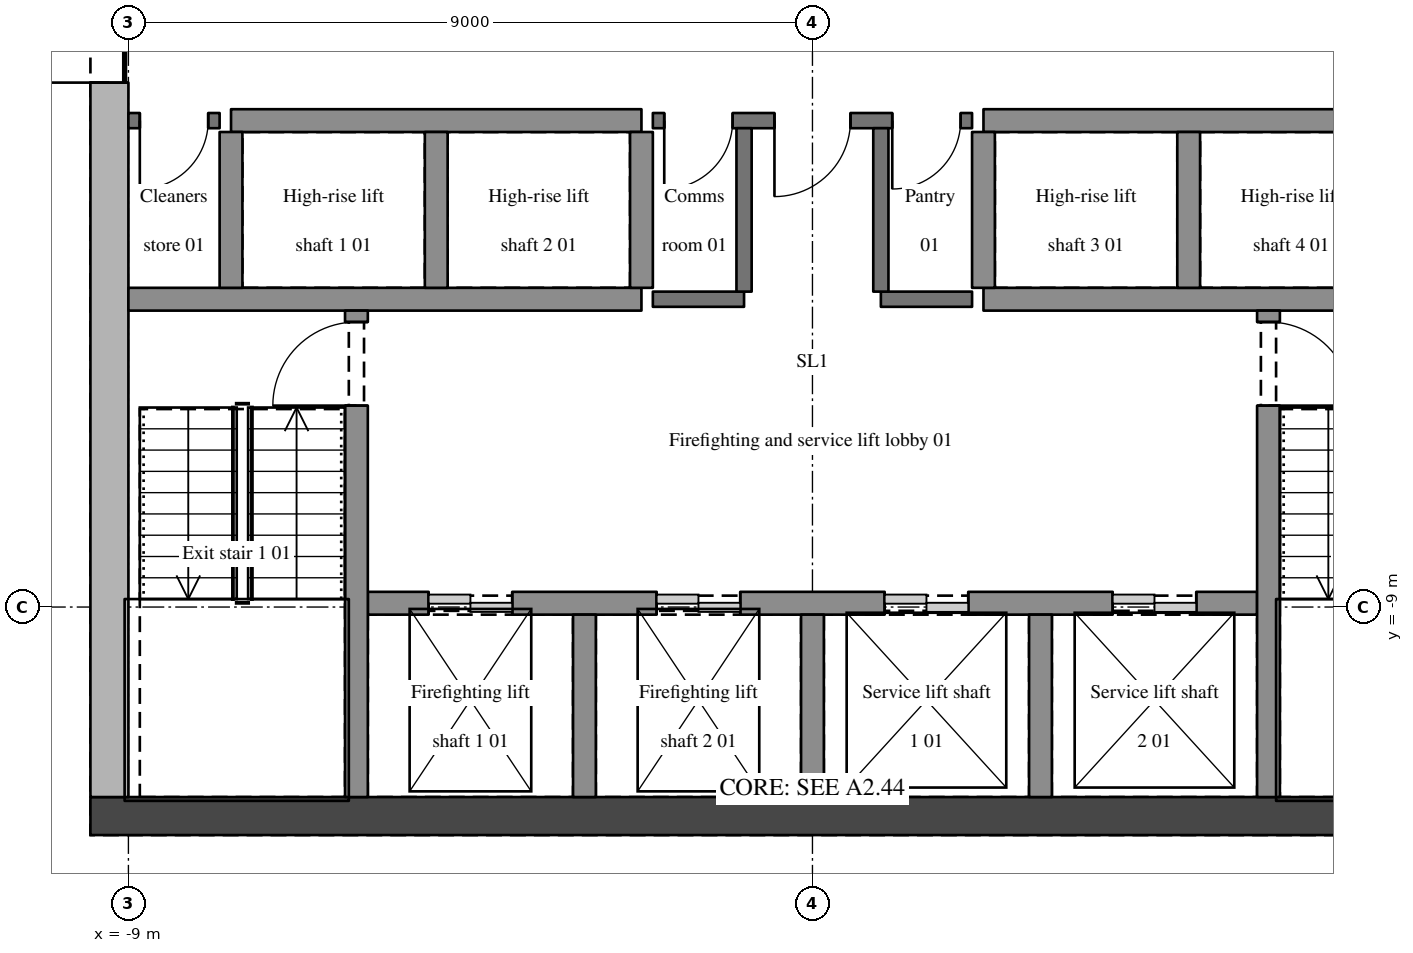
"""IFC4 building model, lengths in metres.
Left out: names, types, materials, properties, quantities, classifications, styles, units other than length and angle.
Written with IfcOpenShell. Run it as: python <this file> out.ifc"""

import sys

from ifc_helpers import new_model, si_unit, direction, frame, frame_2d, origin, place, context, subcontext, project, spatial, polyline, rectangle, outline, extrude, element, fill, save


model = new_model("IFC4")
c1 = context("Model", 3, precision=1e-05, world=origin(), true_north=direction((0.0, 1.0)))
c2 = subcontext(c1, "Body", "Model", "MODEL_VIEW")
j1 = project(units=[si_unit("LENGTHUNIT", "METRE"), si_unit("PLANEANGLEUNIT", "RADIAN")], contexts=[c1])
p1 = place(None, origin())
s1 = spatial("IfcSite", under=j1, at=p1, CompositionType="ELEMENT")
p2 = place(p1, origin())
s2 = spatial("IfcBuilding", under=s1, at=p2, CompositionType="ELEMENT")
p3 = place(p2, frame((0.0, 0.0, 297.3)))
s3 = spatial("IfcBuildingStorey", under=s2, at=p3, CompositionType="ELEMENT", Elevation=297.3)
p4 = place(p3, frame((-9.5, -11.75, 0.0), z_axis=(0.0, 0.0, 1.0), x_axis=(1.0, 0.0, 0.0)))
e1 = element("IfcWall", 1, at=p4, inside=s3, PredefinedType="SHEAR", context=c2, shape_type="SweptSolid", body=[
    extrude(outline(polyline([(0.0, 0.0), (19.0, 0.0), (19.0, 3.6), (0.0, 3.6), (0.0, 0.0)])), frame((0.0, 0.25, 0.0), z_axis=(0.0, -1.0, 0.0), x_axis=(1.0, 0.0, 0.0)), (0.0, 0.0, 1.0), 0.5),
])
p5 = place(p3, frame((-9.25, -11.5, 0.0), z_axis=(0.0, 0.0, 1.0), x_axis=(0.0, 1.0, 0.0)))
e2 = element("IfcWall", 2, at=p5, inside=s3, PredefinedType="SHEAR", context=c2, shape_type="SweptSolid", body=[
    extrude(outline(polyline([(0.0, 0.0), (11.65, 0.0), (11.65, 3.6), (0.0, 3.6), (0.0, 0.0)])), frame((0.0, 0.25, 0.0), z_axis=(0.0, -1.0, 0.0), x_axis=(1.0, 0.0, 0.0)), (0.0, 0.0, 1.0), 0.5),
])
p6 = place(p5, frame((9.4, 0.0, 0.0)))
e3 = element("IfcOpeningElement", 3, at=p6, cuts=e2, PredefinedType="OPENING", context=c2, shape_type="SweptSolid", body=[
    extrude(rectangle(XDim=1.8, YDim=2.1, at=frame_2d((0.9, 1.05))), frame((0.0, 0.26, 0.0), z_axis=(0.0, -1.0, 0.0), x_axis=(1.0, 0.0, 0.0)), (0.0, 0.0, 1.0), 0.52),
])
p7 = place(p3, frame((-5.85, -8.95, 0.0), z_axis=(0.0, 0.0, 1.0), x_axis=(1.0, 0.0, 0.0)))
e4 = element("IfcWall", 4, at=p7, inside=s3, PredefinedType="SHEAR", context=c2, shape_type="SweptSolid", body=[
    extrude(rectangle(XDim=11.7, YDim=0.3, at=frame_2d((5.85, 0.0))), origin(), (0.0, 0.0, 1.0), 3.6),
])
p8 = place(p7, frame((0.8, 0.0, 0.0)))
e5 = element("IfcOpeningElement", 5, at=p8, cuts=e4, PredefinedType="OPENING", context=c2, shape_type="SweptSolid", body=[
    extrude(rectangle(XDim=1.1, YDim=2.1, at=frame_2d((0.55, 1.05))), frame((0.0, 0.16, 0.0), z_axis=(0.0, -1.0, 0.0), x_axis=(1.0, 0.0, 0.0)), (0.0, 0.0, 1.0), 0.32),
])
p9 = place(p7, frame((3.8, 0.0, 0.0)))
e6 = element("IfcOpeningElement", 6, at=p9, cuts=e4, PredefinedType="OPENING", context=c2, shape_type="SweptSolid", body=[
    extrude(rectangle(XDim=1.1, YDim=2.1, at=frame_2d((0.55, 1.05))), frame((0.0, 0.16, 0.0), z_axis=(0.0, -1.0, 0.0), x_axis=(1.0, 0.0, 0.0)), (0.0, 0.0, 1.0), 0.32),
])
p10 = place(p7, frame((6.8, 0.0, 0.0)))
e7 = element("IfcOpeningElement", 7, at=p10, cuts=e4, PredefinedType="OPENING", context=c2, shape_type="SweptSolid", body=[
    extrude(rectangle(XDim=1.1, YDim=2.1, at=frame_2d((0.55, 1.05))), frame((0.0, 0.16, 0.0), z_axis=(0.0, -1.0, 0.0), x_axis=(1.0, 0.0, 0.0)), (0.0, 0.0, 1.0), 0.32),
])
p11 = place(p7, frame((9.8, 0.0, 0.0)))
e8 = element("IfcOpeningElement", 8, at=p11, cuts=e4, PredefinedType="OPENING", context=c2, shape_type="SweptSolid", body=[
    extrude(rectangle(XDim=1.1, YDim=2.1, at=frame_2d((0.55, 1.05))), frame((0.0, 0.16, 0.0), z_axis=(0.0, -1.0, 0.0), x_axis=(1.0, 0.0, 0.0)), (0.0, 0.0, 1.0), 0.32),
])
p12 = place(p3, frame((-9.0, -4.95, 0.0), z_axis=(0.0, 0.0, 1.0), x_axis=(1.0, 0.0, 0.0)))
e9 = element("IfcWall", 9, at=p12, inside=s3, PredefinedType="SHEAR", context=c2, shape_type="SweptSolid", body=[
    extrude(rectangle(XDim=6.75, YDim=0.3, at=frame_2d((3.375, 0.0))), origin(), (0.0, 0.0, 1.0), 3.6),
])
for number, where, z_axis, x_axis in (
    (10, (-2.1, -4.95, 0.0), (0.0, 0.0, 1.0), (1.0, 0.0, 0.0)),
    (11, (0.9, -4.95, 0.0), (0.0, 0.0, 1.0), (1.0, 0.0, 0.0)),
):
    element("IfcWall", number, at=place(p3, frame(where, z_axis=z_axis, x_axis=x_axis)), inside=s3, PredefinedType="SOLIDWALL", context=c2, shape_type="SweptSolid", body=[
        extrude(rectangle(XDim=1.2, YDim=0.2, at=frame_2d((0.6, 0.0))), origin(), (0.0, 0.0, 1.0), 3.3),
    ])
p13 = place(p3, frame((2.25, -4.95, 0.0), z_axis=(0.0, 0.0, 1.0), x_axis=(1.0, 0.0, 0.0)))
e12 = element("IfcWall", 12, at=p13, inside=s3, PredefinedType="SHEAR", context=c2, shape_type="SweptSolid", body=[
    extrude(rectangle(XDim=6.75, YDim=0.3, at=frame_2d((3.375, 0.0))), origin(), (0.0, 0.0, 1.0), 3.6),
])
p14 = place(p3, frame((-7.8, -2.6, 0.0), z_axis=(0.0, 0.0, 1.0), x_axis=(-1.0, 0.0, 0.0)))
e13 = element("IfcWall", 13, at=p14, inside=s3, PredefinedType="SOLIDWALL", context=c2, shape_type="SweptSolid", body=[
    extrude(rectangle(XDim=1.2, YDim=0.2, at=frame_2d((0.6, 0.0))), origin(), (0.0, 0.0, 1.0), 3.3),
])
p15 = place(p14, frame((0.15, 0.0, 0.0)))
e14 = element("IfcOpeningElement", 14, at=p15, cuts=e13, PredefinedType="OPENING", context=c2, shape_type="SweptSolid", body=[
    extrude(rectangle(XDim=0.9, YDim=2.1, at=frame_2d((0.45, 1.05))), frame((0.0, 0.11, 0.0), z_axis=(0.0, -1.0, 0.0), x_axis=(1.0, 0.0, 0.0)), (0.0, 0.0, 1.0), 0.22),
])
p16 = place(p3, frame((-7.65, -2.6, 0.0), z_axis=(0.0, 0.0, 1.0), x_axis=(1.0, 0.0, 0.0)))
e15 = element("IfcWall", 15, at=p16, inside=s3, PredefinedType="SHEAR", context=c2, shape_type="SweptSolid", body=[
    extrude(rectangle(XDim=5.4, YDim=0.3, at=frame_2d((2.7, 0.0))), origin(), (0.0, 0.0, 1.0), 3.6),
])
p17 = place(p3, frame((2.1, -2.6, 0.0), z_axis=(0.0, 0.0, 1.0), x_axis=(-1.0, 0.0, 0.0)))
e16 = element("IfcWall", 16, at=p17, inside=s3, PredefinedType="SOLIDWALL", context=c2, shape_type="SweptSolid", body=[
    extrude(rectangle(XDim=4.2, YDim=0.2, at=frame_2d((2.1, 0.0))), origin(), (0.0, 0.0, 1.0), 3.3),
])
p18 = place(p17, frame((1.6, 0.0, 0.0)))
e17 = element("IfcOpeningElement", 17, at=p18, cuts=e16, PredefinedType="OPENING", context=c2, shape_type="SweptSolid", body=[
    extrude(rectangle(XDim=1.0, YDim=2.1, at=frame_2d((0.5, 1.05))), frame((0.0, 0.11, 0.0), z_axis=(0.0, -1.0, 0.0), x_axis=(1.0, 0.0, 0.0)), (0.0, 0.0, 1.0), 0.22),
])
p19 = place(p17, frame((3.15, 0.0, 0.0)))
e18 = element("IfcOpeningElement", 18, at=p19, cuts=e16, PredefinedType="OPENING", context=c2, shape_type="SweptSolid", body=[
    extrude(rectangle(XDim=0.9, YDim=2.1, at=frame_2d((0.45, 1.05))), frame((0.0, 0.11, 0.0), z_axis=(0.0, -1.0, 0.0), x_axis=(1.0, 0.0, 0.0)), (0.0, 0.0, 1.0), 0.22),
])
p20 = place(p17, frame((0.15, 0.0, 0.0)))
e19 = element("IfcOpeningElement", 19, at=p20, cuts=e16, PredefinedType="OPENING", context=c2, shape_type="SweptSolid", body=[
    extrude(rectangle(XDim=0.9, YDim=2.1, at=frame_2d((0.45, 1.05))), frame((0.0, 0.11, 0.0), z_axis=(0.0, -1.0, 0.0), x_axis=(1.0, 0.0, 0.0)), (0.0, 0.0, 1.0), 0.22),
])
p21 = place(p3, frame((2.25, -2.6, 0.0), z_axis=(0.0, 0.0, 1.0), x_axis=(1.0, 0.0, 0.0)))
e20 = element("IfcWall", 20, at=p21, inside=s3, PredefinedType="SHEAR", context=c2, shape_type="SweptSolid", body=[
    extrude(rectangle(XDim=5.4, YDim=0.3, at=frame_2d((2.7, 0.0))), origin(), (0.0, 0.0, 1.0), 3.6),
])
p22 = place(p3, frame((-7.65, -4.8, 0.0), z_axis=(0.0, 0.0, 1.0), x_axis=(0.0, 1.0, 0.0)))
e21 = element("IfcWall", 21, at=p22, inside=s3, PredefinedType="SHEAR", context=c2, shape_type="SweptSolid", body=[
    extrude(rectangle(XDim=2.05, YDim=0.3, at=frame_2d((1.025, 0.0))), origin(), (0.0, 0.0, 1.0), 3.6),
])
p23 = place(p3, frame((-6.0, -11.5, 0.0), z_axis=(0.0, 0.0, 1.0), x_axis=(0.0, 1.0, 0.0)))
e22 = element("IfcWall", 22, at=p23, inside=s3, PredefinedType="SHEAR", context=c2, shape_type="SweptSolid", body=[
    extrude(rectangle(XDim=6.4, YDim=0.3, at=frame_2d((3.2, 0.0))), origin(), (0.0, 0.0, 1.0), 3.6),
])
p24 = place(p23, frame((5.15, 0.0, 0.0)))
e23 = element("IfcOpeningElement", 23, at=p24, cuts=e22, PredefinedType="OPENING", context=c2, shape_type="SweptSolid", body=[
    extrude(rectangle(XDim=1.1, YDim=2.1, at=frame_2d((0.55, 1.05))), frame((0.0, 0.16, 0.0), z_axis=(0.0, -1.0, 0.0), x_axis=(1.0, 0.0, 0.0)), (0.0, 0.0, 1.0), 0.32),
])
p25 = place(p3, frame((-4.95, -4.8, 0.0), z_axis=(0.0, 0.0, 1.0), x_axis=(0.0, 1.0, 0.0)))
e24 = element("IfcWall", 24, at=p25, inside=s3, PredefinedType="SHEAR", context=c2, shape_type="SweptSolid", body=[
    extrude(rectangle(XDim=2.05, YDim=0.3, at=frame_2d((1.025, 0.0))), origin(), (0.0, 0.0, 1.0), 3.6),
])
p26 = place(p3, frame((-3.0, -11.5, 0.0), z_axis=(0.0, 0.0, 1.0), x_axis=(0.0, 1.0, 0.0)))
e25 = element("IfcWall", 25, at=p26, inside=s3, PredefinedType="SHEAR", context=c2, shape_type="SweptSolid", body=[
    extrude(rectangle(XDim=2.4, YDim=0.3, at=frame_2d((1.2, 0.0))), origin(), (0.0, 0.0, 1.0), 3.6),
])
p27 = place(p3, frame((-2.25, -4.8, 0.0), z_axis=(0.0, 0.0, 1.0), x_axis=(0.0, 1.0, 0.0)))
e26 = element("IfcWall", 26, at=p27, inside=s3, PredefinedType="SHEAR", context=c2, shape_type="SweptSolid", body=[
    extrude(rectangle(XDim=2.05, YDim=0.3, at=frame_2d((1.025, 0.0))), origin(), (0.0, 0.0, 1.0), 3.6),
])
p28 = place(p3, frame((-0.9, -4.85, 0.0), z_axis=(0.0, 0.0, 1.0), x_axis=(0.0, 1.0, 0.0)))
e27 = element("IfcWall", 27, at=p28, inside=s3, PredefinedType="SOLIDWALL", context=c2, shape_type="SweptSolid", body=[
    extrude(rectangle(XDim=2.15, YDim=0.2, at=frame_2d((1.075, 0.0))), origin(), (0.0, 0.0, 1.0), 3.3),
])
p29 = place(p3, frame((0.0, -11.5, 0.0), z_axis=(0.0, 0.0, 1.0), x_axis=(0.0, 1.0, 0.0)))
e28 = element("IfcWall", 28, at=p29, inside=s3, PredefinedType="SHEAR", context=c2, shape_type="SweptSolid", body=[
    extrude(rectangle(XDim=2.4, YDim=0.3, at=frame_2d((1.2, 0.0))), origin(), (0.0, 0.0, 1.0), 3.6),
])
p30 = place(p3, frame((0.9, -4.85, 0.0), z_axis=(0.0, 0.0, 1.0), x_axis=(0.0, 1.0, 0.0)))
e29 = element("IfcWall", 29, at=p30, inside=s3, PredefinedType="SOLIDWALL", context=c2, shape_type="SweptSolid", body=[
    extrude(rectangle(XDim=2.15, YDim=0.2, at=frame_2d((1.075, 0.0))), origin(), (0.0, 0.0, 1.0), 3.3),
])
p31 = place(p3, frame((2.25, -4.8, 0.0), z_axis=(0.0, 0.0, 1.0), x_axis=(0.0, 1.0, 0.0)))
e30 = element("IfcWall", 30, at=p31, inside=s3, PredefinedType="SHEAR", context=c2, shape_type="SweptSolid", body=[
    extrude(rectangle(XDim=2.05, YDim=0.3, at=frame_2d((1.025, 0.0))), origin(), (0.0, 0.0, 1.0), 3.6),
])
p32 = place(p3, frame((3.0, -11.5, 0.0), z_axis=(0.0, 0.0, 1.0), x_axis=(0.0, 1.0, 0.0)))
e31 = element("IfcWall", 31, at=p32, inside=s3, PredefinedType="SHEAR", context=c2, shape_type="SweptSolid", body=[
    extrude(rectangle(XDim=2.4, YDim=0.3, at=frame_2d((1.2, 0.0))), origin(), (0.0, 0.0, 1.0), 3.6),
])
p33 = place(p3, frame((4.95, -4.8, 0.0), z_axis=(0.0, 0.0, 1.0), x_axis=(0.0, 1.0, 0.0)))
e32 = element("IfcWall", 32, at=p33, inside=s3, PredefinedType="SHEAR", context=c2, shape_type="SweptSolid", body=[
    extrude(rectangle(XDim=2.05, YDim=0.3, at=frame_2d((1.025, 0.0))), origin(), (0.0, 0.0, 1.0), 3.6),
])
p34 = place(p3, frame((6.0, -5.1, 0.0), z_axis=(0.0, 0.0, 1.0), x_axis=(0.0, -1.0, 0.0)))
e33 = element("IfcWall", 33, at=p34, inside=s3, PredefinedType="SHEAR", context=c2, shape_type="SweptSolid", body=[
    extrude(rectangle(XDim=6.4, YDim=0.3, at=frame_2d((3.2, 0.0))), origin(), (0.0, 0.0, 1.0), 3.6),
])
p35 = place(p34, frame((0.15, 0.0, 0.0)))
e34 = element("IfcOpeningElement", 34, at=p35, cuts=e33, PredefinedType="OPENING", context=c2, shape_type="SweptSolid", body=[
    extrude(rectangle(XDim=1.1, YDim=2.1, at=frame_2d((0.55, 1.05))), frame((0.0, 0.16, 0.0), z_axis=(0.0, -1.0, 0.0), x_axis=(1.0, 0.0, 0.0)), (0.0, 0.0, 1.0), 0.32),
])
p36 = place(p6, origin())
e35 = element("IfcDoor", 35, at=p36, inside=s3, OperationType="DOUBLE_DOOR_SINGLE_SWING", PredefinedType="DOOR", context=c2, shape_type="SweptSolid", body=[
    extrude(rectangle(XDim=1.8, YDim=2.1, at=frame_2d((0.9, 1.05))), frame((0.0, 0.025, 0.0), z_axis=(0.0, -1.0, 0.0), x_axis=(1.0, 0.0, 0.0)), (0.0, 0.0, 1.0), 0.05),
])
fill(e3, e35)
p37 = place(p18, origin())
e36 = element("IfcDoor", 36, at=p37, inside=s3, OperationType="SINGLE_SWING_RIGHT", PredefinedType="DOOR", context=c2, shape_type="SweptSolid", body=[
    extrude(rectangle(XDim=1.0, YDim=2.1, at=frame_2d((0.5, 1.05))), frame((0.0, 0.025, 0.0), z_axis=(0.0, -1.0, 0.0), x_axis=(1.0, 0.0, 0.0)), (0.0, 0.0, 1.0), 0.05),
])
fill(e17, e36)
p38 = place(p24, origin())
e37 = element("IfcDoor", 37, at=p38, inside=s3, OperationType="SINGLE_SWING_LEFT", PredefinedType="DOOR", context=c2, shape_type="SweptSolid", body=[
    extrude(rectangle(XDim=1.1, YDim=2.1, at=frame_2d((0.55, 1.05))), frame((0.0, 0.025, 0.0), z_axis=(0.0, -1.0, 0.0), x_axis=(1.0, 0.0, 0.0)), (0.0, 0.0, 1.0), 0.05),
])
fill(e23, e37)
p39 = place(p35, origin())
e38 = element("IfcDoor", 38, at=p39, inside=s3, OperationType="SINGLE_SWING_RIGHT", PredefinedType="DOOR", context=c2, shape_type="SweptSolid", body=[
    extrude(rectangle(XDim=1.1, YDim=2.1, at=frame_2d((0.55, 1.05))), frame((0.0, 0.025, 0.0), z_axis=(0.0, -1.0, 0.0), x_axis=(1.0, 0.0, 0.0)), (0.0, 0.0, 1.0), 0.05),
])
fill(e34, e38)
p40 = place(p19, origin())
e39 = element("IfcDoor", 39, at=p40, inside=s3, OperationType="SINGLE_SWING_RIGHT", PredefinedType="DOOR", context=c2, shape_type="SweptSolid", body=[
    extrude(rectangle(XDim=0.9, YDim=2.1, at=frame_2d((0.45, 1.05))), frame((0.0, 0.025, 0.0), z_axis=(0.0, -1.0, 0.0), x_axis=(1.0, 0.0, 0.0)), (0.0, 0.0, 1.0), 0.05),
])
fill(e18, e39)
p41 = place(p20, origin())
e40 = element("IfcDoor", 40, at=p41, inside=s3, OperationType="SINGLE_SWING_RIGHT", PredefinedType="DOOR", context=c2, shape_type="SweptSolid", body=[
    extrude(rectangle(XDim=0.9, YDim=2.1, at=frame_2d((0.45, 1.05))), frame((0.0, 0.025, 0.0), z_axis=(0.0, -1.0, 0.0), x_axis=(1.0, 0.0, 0.0)), (0.0, 0.0, 1.0), 0.05),
])
fill(e19, e40)
p42 = place(p15, origin())
e41 = element("IfcDoor", 41, at=p42, inside=s3, OperationType="SINGLE_SWING_RIGHT", PredefinedType="DOOR", context=c2, shape_type="SweptSolid", body=[
    extrude(rectangle(XDim=0.9, YDim=2.1, at=frame_2d((0.45, 1.05))), frame((0.0, 0.025, 0.0), z_axis=(0.0, -1.0, 0.0), x_axis=(1.0, 0.0, 0.0)), (0.0, 0.0, 1.0), 0.05),
])
fill(e14, e41)
p43 = place(p8, origin())
e42 = element("IfcDoor", 42, at=p43, inside=s3, OperationType="DOUBLE_DOOR_SLIDING", PredefinedType="DOOR", context=c2, shape_type="SweptSolid", body=[
    extrude(rectangle(XDim=1.1, YDim=2.1, at=frame_2d((0.55, 1.05))), frame((0.0, 0.025, 0.0), z_axis=(0.0, -1.0, 0.0), x_axis=(1.0, 0.0, 0.0)), (0.0, 0.0, 1.0), 0.05),
])
fill(e5, e42)
p44 = place(p9, origin())
e43 = element("IfcDoor", 43, at=p44, inside=s3, OperationType="DOUBLE_DOOR_SLIDING", PredefinedType="DOOR", context=c2, shape_type="SweptSolid", body=[
    extrude(rectangle(XDim=1.1, YDim=2.1, at=frame_2d((0.55, 1.05))), frame((0.0, 0.025, 0.0), z_axis=(0.0, -1.0, 0.0), x_axis=(1.0, 0.0, 0.0)), (0.0, 0.0, 1.0), 0.05),
])
fill(e6, e43)
p45 = place(p10, origin())
e44 = element("IfcDoor", 44, at=p45, inside=s3, OperationType="DOUBLE_DOOR_SLIDING", PredefinedType="DOOR", context=c2, shape_type="SweptSolid", body=[
    extrude(rectangle(XDim=1.1, YDim=2.1, at=frame_2d((0.55, 1.05))), frame((0.0, 0.025, 0.0), z_axis=(0.0, -1.0, 0.0), x_axis=(1.0, 0.0, 0.0)), (0.0, 0.0, 1.0), 0.05),
])
fill(e7, e44)
p46 = place(p11, origin())
e45 = element("IfcDoor", 45, at=p46, inside=s3, OperationType="DOUBLE_DOOR_SLIDING", PredefinedType="DOOR", context=c2, shape_type="SweptSolid", body=[
    extrude(rectangle(XDim=1.1, YDim=2.1, at=frame_2d((0.55, 1.05))), frame((0.0, 0.025, 0.0), z_axis=(0.0, -1.0, 0.0), x_axis=(1.0, 0.0, 0.0)), (0.0, 0.0, 1.0), 0.05),
])
fill(e8, e45)
save(model, sys.argv[1])
